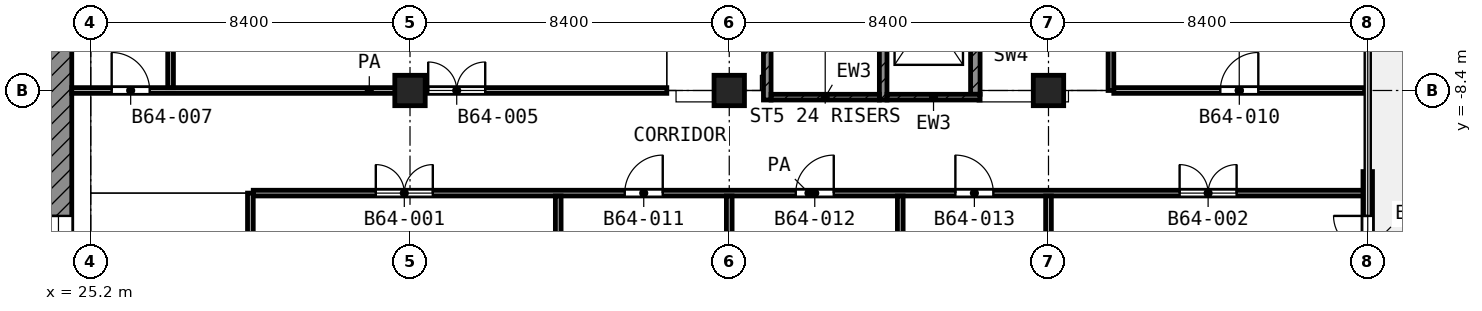
"""IFC4 building model, lengths in metres.
Left out: names, types, materials, properties, quantities, classifications, styles, units other than length and angle.
Written with IfcOpenShell. Run it as: python <this file> out.ifc"""

import sys

from ifc_helpers import new_model, si_unit, direction, frame, frame_2d, origin, origin_2d, place, context, subcontext, project, spatial, rectangle, extrude, element, fill, save


model = new_model("IFC4")
c1 = context("Model", 3, precision=1e-05, world=origin(), true_north=direction((0.0, 1.0)))
c2 = subcontext(c1, "Body", "Model", "MODEL_VIEW")
j1 = project(units=[si_unit("LENGTHUNIT", "METRE"), si_unit("PLANEANGLEUNIT", "RADIAN")], contexts=[c1])
p1 = place(None, origin())
s1 = spatial("IfcSite", under=j1, at=p1, CompositionType="ELEMENT")
p2 = place(p1, origin())
s2 = spatial("IfcBuilding", under=s1, at=p2, CompositionType="ELEMENT")
p3 = place(p2, frame((0.0, 0.0, 277.6)))
s3 = spatial("IfcBuildingStorey", under=s2, at=p3, CompositionType="ELEMENT", Elevation=277.6)
for number, where, z_axis, x_axis in (
    (1, (33.6, -8.4, 0.0), (0.0, 0.0, 1.0), (1.0, 0.0, 0.0)),
    (2, (42.0, -8.4, 0.0), (0.0, 0.0, 1.0), (1.0, 0.0, 0.0)),
    (3, (50.4, -8.4, 0.0), (0.0, 0.0, 1.0), (1.0, 0.0, 0.0)),
):
    element("IfcColumn", number, at=place(p3, frame(where, z_axis=z_axis, x_axis=x_axis)), inside=s3, PredefinedType="COLUMN", context=c2, shape_type="SweptSolid", body=[
        extrude(rectangle(XDim=0.8, YDim=0.8, at=origin_2d()), origin(), (0.0, 0.0, 1.0), 4.2),
    ])
p4 = place(p3, frame((58.8, -14.667, 0.0), z_axis=(0.0, 0.0, 1.0), x_axis=(0.0, 1.0, 0.0)))
e4 = element("IfcWall", 4, at=p4, inside=s3, PredefinedType="SOLIDWALL", context=c2, shape_type="SweptSolid", body=[
    extrude(rectangle(XDim=4.133, YDim=0.25, at=frame_2d((2.067, 0.0))), origin(), (0.0, 0.0, 1.0), 3.48),
])
p5 = place(p4, frame((1.167, 0.0, 0.0)))
e5 = element("IfcOpeningElement", 5, at=p5, cuts=e4, PredefinedType="OPENING", context=c2, shape_type="SweptSolid", body=[
    extrude(rectangle(XDim=1.8, YDim=2.1, at=frame_2d((0.9, 1.05))), frame((0.0, 0.135, 0.0), z_axis=(0.0, -1.0, 0.0), x_axis=(1.0, 0.0, 0.0)), (0.0, 0.0, 1.0), 0.27),
])
p6 = place(p3, frame((24.35, -24.0, 0.0), z_axis=(0.0, 0.0, 1.0), x_axis=(0.0, 1.0, 0.0)))
e6 = element("IfcWall", 6, at=p6, inside=s3, PredefinedType="SHEAR", context=c2, shape_type="SweptSolid", body=[
    extrude(rectangle(XDim=18.6, YDim=0.7, at=frame_2d((9.3, 0.0))), origin(), (0.0, 0.0, 1.0), 3.6),
])
p7 = place(p6, frame((10.5, 0.0, 0.0)))
e7 = element("IfcOpeningElement", 7, at=p7, cuts=e6, PredefinedType="OPENING", context=c2, shape_type="SweptSolid", body=[
    extrude(rectangle(XDim=1.8, YDim=2.1, at=frame_2d((0.9, 1.05))), frame((0.0, 0.36, 0.0), z_axis=(0.0, -1.0, 0.0), x_axis=(1.0, 0.0, 0.0)), (0.0, 0.0, 1.0), 0.72),
])
p8 = place(p3, frame((43.0, -8.65, 0.0), z_axis=(0.0, 0.0, 1.0), x_axis=(0.0, 1.0, 0.0)))
e8 = element("IfcWall", 8, at=p8, inside=s3, PredefinedType="SHEAR", context=c2, shape_type="SweptSolid", body=[
    extrude(rectangle(XDim=8.35, YDim=0.2, at=frame_2d((4.175, 0.0))), origin(), (0.0, 0.0, 1.0), 3.6),
])
p9 = place(p8, frame((7.0, 0.0, 0.0)))
e9 = element("IfcOpeningElement", 9, at=p9, cuts=e8, PredefinedType="OPENING", context=c2, shape_type="SweptSolid", body=[
    extrude(rectangle(XDim=1.1, YDim=2.1, at=frame_2d((0.55, 1.05))), frame((0.0, 0.11, 0.0), z_axis=(0.0, -1.0, 0.0), x_axis=(1.0, 0.0, 0.0)), (0.0, 0.0, 1.0), 0.22),
])
p10 = place(p3, frame((46.05, -8.65, 0.0), z_axis=(0.0, 0.0, 1.0), x_axis=(0.0, 1.0, 0.0)))
e10 = element("IfcWall", 10, at=p10, inside=s3, PredefinedType="SHEAR", context=c2, shape_type="SweptSolid", body=[
    extrude(rectangle(XDim=8.35, YDim=0.2, at=frame_2d((4.175, 0.0))), origin(), (0.0, 0.0, 1.0), 3.6),
])
p11 = place(p10, frame((7.0, 0.0, 0.0)))
e11 = element("IfcOpeningElement", 11, at=p11, cuts=e10, PredefinedType="OPENING", context=c2, shape_type="SweptSolid", body=[
    extrude(rectangle(XDim=1.1, YDim=2.1, at=frame_2d((0.55, 1.05))), frame((0.0, 0.11, 0.0), z_axis=(0.0, -1.0, 0.0), x_axis=(1.0, 0.0, 0.0)), (0.0, 0.0, 1.0), 0.22),
])
p12 = place(p3, frame((43.1, -8.575, 0.0), z_axis=(0.0, 0.0, 1.0), x_axis=(1.0, 0.0, 0.0)))
e12 = element("IfcWall", 12, at=p12, inside=s3, PredefinedType="SHEAR", context=c2, shape_type="SweptSolid", body=[
    extrude(rectangle(XDim=2.85, YDim=0.15, at=frame_2d((1.425, 0.0))), origin(), (0.0, 0.0, 1.0), 3.6),
])
p13 = place(p3, frame((46.15, -8.575, 0.0), z_axis=(0.0, 0.0, 1.0), x_axis=(1.0, 0.0, 0.0)))
e13 = element("IfcWall", 13, at=p13, inside=s3, PredefinedType="SHEAR", context=c2, shape_type="SweptSolid", body=[
    extrude(rectangle(XDim=2.45, YDim=0.15, at=frame_2d((1.225, 0.0))), origin(), (0.0, 0.0, 1.0), 3.6),
])
p14 = place(p3, frame((48.475, -8.5, 0.0), z_axis=(0.0, 0.0, 1.0), x_axis=(0.0, 1.0, 0.0)))
e14 = element("IfcWall", 14, at=p14, inside=s3, PredefinedType="SHEAR", context=c2, shape_type="SweptSolid", body=[
    extrude(rectangle(XDim=3.475, YDim=0.25, at=frame_2d((1.738, 0.0))), origin(), (0.0, 0.0, 1.0), 3.6),
])
p15 = place(p3, frame((29.475, -11.1, 0.0), z_axis=(0.0, 0.0, 1.0), x_axis=(1.0, 0.0, 0.0)))
e15 = element("IfcWall", 15, at=p15, inside=s3, PredefinedType="PARTITIONING", context=c2, shape_type="SweptSolid", body=[
    extrude(rectangle(XDim=29.245, YDim=0.15, at=frame_2d((14.623, 0.0))), origin(), (0.0, 0.0, 1.0), 3.6),
])
p16 = place(p15, frame((3.225, 0.0, 0.0)))
e16 = element("IfcOpeningElement", 16, at=p16, cuts=e15, PredefinedType="OPENING", context=c2, shape_type="SweptSolid", body=[
    extrude(rectangle(XDim=1.5, YDim=2.1, at=frame_2d((0.75, 1.05))), frame((0.0, 0.085, 0.0), z_axis=(0.0, -1.0, 0.0), x_axis=(1.0, 0.0, 0.0)), (0.0, 0.0, 1.0), 0.17),
])
p17 = place(p15, frame((9.775, 0.0, 0.0)))
e17 = element("IfcOpeningElement", 17, at=p17, cuts=e15, PredefinedType="OPENING", context=c2, shape_type="SweptSolid", body=[
    extrude(rectangle(XDim=1.0, YDim=2.1, at=frame_2d((0.5, 1.05))), frame((0.0, 0.085, 0.0), z_axis=(0.0, -1.0, 0.0), x_axis=(1.0, 0.0, 0.0)), (0.0, 0.0, 1.0), 0.17),
])
p18 = place(p15, frame((14.275, 0.0, 0.0)))
e18 = element("IfcOpeningElement", 18, at=p18, cuts=e15, PredefinedType="OPENING", context=c2, shape_type="SweptSolid", body=[
    extrude(rectangle(XDim=1.0, YDim=2.1, at=frame_2d((0.5, 1.05))), frame((0.0, 0.085, 0.0), z_axis=(0.0, -1.0, 0.0), x_axis=(1.0, 0.0, 0.0)), (0.0, 0.0, 1.0), 0.17),
])
p19 = place(p15, frame((18.475, 0.0, 0.0)))
e19 = element("IfcOpeningElement", 19, at=p19, cuts=e15, PredefinedType="OPENING", context=c2, shape_type="SweptSolid", body=[
    extrude(rectangle(XDim=1.0, YDim=2.1, at=frame_2d((0.5, 1.05))), frame((0.0, 0.085, 0.0), z_axis=(0.0, -1.0, 0.0), x_axis=(1.0, 0.0, 0.0)), (0.0, 0.0, 1.0), 0.17),
])
p20 = place(p15, frame((24.375, 0.0, 0.0)))
e20 = element("IfcOpeningElement", 20, at=p20, cuts=e15, PredefinedType="OPENING", context=c2, shape_type="SweptSolid", body=[
    extrude(rectangle(XDim=1.5, YDim=2.1, at=frame_2d((0.75, 1.05))), frame((0.0, 0.085, 0.0), z_axis=(0.0, -1.0, 0.0), x_axis=(1.0, 0.0, 0.0)), (0.0, 0.0, 1.0), 0.17),
])
p21 = place(p3, frame((24.7, -8.4, 0.0), z_axis=(0.0, 0.0, 1.0), x_axis=(1.0, 0.0, 0.0)))
e21 = element("IfcWall", 21, at=p21, inside=s3, PredefinedType="PARTITIONING", context=c2, shape_type="SweptSolid", body=[
    extrude(rectangle(XDim=15.657, YDim=0.15, at=frame_2d((7.829, 0.0))), origin(), (0.0, 0.0, 1.0), 3.6),
])
p22 = place(p21, frame((1.05, 0.0, 0.0)))
e22 = element("IfcOpeningElement", 22, at=p22, cuts=e21, PredefinedType="OPENING", context=c2, shape_type="SweptSolid", body=[
    extrude(rectangle(XDim=1.0, YDim=2.1, at=frame_2d((0.5, 1.05))), frame((0.0, 0.085, 0.0), z_axis=(0.0, -1.0, 0.0), x_axis=(1.0, 0.0, 0.0)), (0.0, 0.0, 1.0), 0.17),
])
p23 = place(p21, frame((9.379, 0.0, 0.0)))
e23 = element("IfcOpeningElement", 23, at=p23, cuts=e21, PredefinedType="OPENING", context=c2, shape_type="SweptSolid", body=[
    extrude(rectangle(XDim=1.5, YDim=2.1, at=frame_2d((0.75, 1.05))), frame((0.0, 0.085, 0.0), z_axis=(0.0, -1.0, 0.0), x_axis=(1.0, 0.0, 0.0)), (0.0, 0.0, 1.0), 0.17),
])
p24 = place(p3, frame((52.118, -8.4, 0.0), z_axis=(0.0, 0.0, 1.0), x_axis=(1.0, 0.0, 0.0)))
e24 = element("IfcWall", 24, at=p24, inside=s3, PredefinedType="PARTITIONING", context=c2, shape_type="SweptSolid", body=[
    extrude(rectangle(XDim=6.602, YDim=0.15, at=frame_2d((3.301, 0.0))), origin(), (0.0, 0.0, 1.0), 3.6),
])
p25 = place(p24, frame((2.803, 0.0, 0.0)))
e25 = element("IfcOpeningElement", 25, at=p25, cuts=e24, PredefinedType="OPENING", context=c2, shape_type="SweptSolid", body=[
    extrude(rectangle(XDim=1.0, YDim=2.1, at=frame_2d((0.5, 1.05))), frame((0.0, 0.085, 0.0), z_axis=(0.0, -1.0, 0.0), x_axis=(1.0, 0.0, 0.0)), (0.0, 0.0, 1.0), 0.17),
])
p26 = place(p3, frame((27.3, -8.325, 0.0), z_axis=(0.0, 0.0, 1.0), x_axis=(0.0, 1.0, 0.0)))
e26 = element("IfcWall", 26, at=p26, inside=s3, PredefinedType="PARTITIONING", context=c2, shape_type="SweptSolid", body=[
    extrude(rectangle(XDim=8.245, YDim=0.15, at=frame_2d((4.123, 0.0))), origin(), (0.0, 0.0, 1.0), 3.6),
])
p27 = place(p3, frame((29.4, -31.198, 0.0), z_axis=(0.0, 0.0, 1.0), x_axis=(0.0, 1.0, 0.0)))
e27 = element("IfcWall", 27, at=p27, inside=s3, PredefinedType="PARTITIONING", context=c2, shape_type="SweptSolid", body=[
    extrude(rectangle(XDim=20.098, YDim=0.15, at=frame_2d((10.049, 0.0))), origin(), (0.0, 0.0, 1.0), 3.6),
])
for number, where, z_axis, x_axis in (
    (28, (37.5, -16.72, 0.0), (0.0, 0.0, 1.0), (0.0, 1.0, 0.0)),
    (29, (42.0, -16.72, 0.0), (0.0, 0.0, 1.0), (0.0, 1.0, 0.0)),
    (30, (46.5, -16.72, 0.0), (0.0, 0.0, 1.0), (0.0, 1.0, 0.0)),
    (31, (50.4, -16.72, 0.0), (0.0, 0.0, 1.0), (0.0, 1.0, 0.0)),
):
    element("IfcWall", number, at=place(p3, frame(where, z_axis=z_axis, x_axis=x_axis)), inside=s3, PredefinedType="PARTITIONING", context=c2, shape_type="SweptSolid", body=[
        extrude(rectangle(XDim=5.545, YDim=0.15, at=frame_2d((2.772, 0.0))), origin(), (0.0, 0.0, 1.0), 3.6),
    ])
p28 = place(p3, frame((52.043, -8.4, 0.0), z_axis=(0.0, 0.0, 1.0), x_axis=(0.0, 1.0, 0.0)))
e32 = element("IfcWall", 32, at=p28, inside=s3, PredefinedType="PARTITIONING", context=c2, shape_type="SweptSolid", body=[
    extrude(rectangle(XDim=6.55, YDim=0.15, at=frame_2d((3.275, 0.0))), origin(), (0.0, 0.0, 1.0), 3.6),
])
p29 = place(p5, origin())
e33 = element("IfcDoor", 33, at=p29, inside=s3, OperationType="DOUBLE_DOOR_SINGLE_SWING", PredefinedType="DOOR", context=c2, shape_type="SweptSolid", body=[
    extrude(rectangle(XDim=1.8, YDim=2.1, at=frame_2d((0.9, 1.05))), frame((0.0, 0.025, 0.0), z_axis=(0.0, -1.0, 0.0), x_axis=(1.0, 0.0, 0.0)), (0.0, 0.0, 1.0), 0.05),
])
fill(e5, e33)
p30 = place(p7, origin())
e34 = element("IfcDoor", 34, at=p30, inside=s3, OperationType="DOUBLE_DOOR_SINGLE_SWING", PredefinedType="DOOR", context=c2, shape_type="SweptSolid", body=[
    extrude(rectangle(XDim=1.8, YDim=2.1, at=frame_2d((0.9, 1.05))), frame((0.0, 0.025, 0.0), z_axis=(0.0, -1.0, 0.0), x_axis=(1.0, 0.0, 0.0)), (0.0, 0.0, 1.0), 0.05),
])
fill(e7, e34)
p31 = place(p25, origin())
e35 = element("IfcDoor", 35, at=p31, inside=s3, OperationType="SINGLE_SWING_RIGHT", PredefinedType="DOOR", context=c2, shape_type="SweptSolid", body=[
    extrude(rectangle(XDim=1.0, YDim=2.1, at=frame_2d((0.5, 1.05))), frame((0.0, 0.025, 0.0), z_axis=(0.0, -1.0, 0.0), x_axis=(1.0, 0.0, 0.0)), (0.0, 0.0, 1.0), 0.05),
])
fill(e25, e35)
p32 = place(p16, origin())
e36 = element("IfcDoor", 36, at=p32, inside=s3, OperationType="DOUBLE_DOOR_SINGLE_SWING", PredefinedType="DOOR", context=c2, shape_type="SweptSolid", body=[
    extrude(rectangle(XDim=1.5, YDim=2.1, at=frame_2d((0.75, 1.05))), frame((0.0, 0.025, 0.0), z_axis=(0.0, -1.0, 0.0), x_axis=(1.0, 0.0, 0.0)), (0.0, 0.0, 1.0), 0.05),
])
fill(e16, e36)
p33 = place(p17, origin())
e37 = element("IfcDoor", 37, at=p33, inside=s3, OperationType="SINGLE_SWING_RIGHT", PredefinedType="DOOR", context=c2, shape_type="SweptSolid", body=[
    extrude(rectangle(XDim=1.0, YDim=2.1, at=frame_2d((0.5, 1.05))), frame((0.0, 0.025, 0.0), z_axis=(0.0, -1.0, 0.0), x_axis=(1.0, 0.0, 0.0)), (0.0, 0.0, 1.0), 0.05),
])
fill(e17, e37)
p34 = place(p18, origin())
e38 = element("IfcDoor", 38, at=p34, inside=s3, OperationType="SINGLE_SWING_RIGHT", PredefinedType="DOOR", context=c2, shape_type="SweptSolid", body=[
    extrude(rectangle(XDim=1.0, YDim=2.1, at=frame_2d((0.5, 1.05))), frame((0.0, 0.025, 0.0), z_axis=(0.0, -1.0, 0.0), x_axis=(1.0, 0.0, 0.0)), (0.0, 0.0, 1.0), 0.05),
])
fill(e18, e38)
p35 = place(p19, origin())
e39 = element("IfcDoor", 39, at=p35, inside=s3, OperationType="SINGLE_SWING_LEFT", PredefinedType="DOOR", context=c2, shape_type="SweptSolid", body=[
    extrude(rectangle(XDim=1.0, YDim=2.1, at=frame_2d((0.5, 1.05))), frame((0.0, 0.025, 0.0), z_axis=(0.0, -1.0, 0.0), x_axis=(1.0, 0.0, 0.0)), (0.0, 0.0, 1.0), 0.05),
])
fill(e19, e39)
p36 = place(p20, origin())
e40 = element("IfcDoor", 40, at=p36, inside=s3, OperationType="DOUBLE_DOOR_SINGLE_SWING", PredefinedType="DOOR", context=c2, shape_type="SweptSolid", body=[
    extrude(rectangle(XDim=1.5, YDim=2.1, at=frame_2d((0.75, 1.05))), frame((0.0, 0.025, 0.0), z_axis=(0.0, -1.0, 0.0), x_axis=(1.0, 0.0, 0.0)), (0.0, 0.0, 1.0), 0.05),
])
fill(e20, e40)
p37 = place(p22, origin())
e41 = element("IfcDoor", 41, at=p37, inside=s3, OperationType="SINGLE_SWING_LEFT", PredefinedType="DOOR", context=c2, shape_type="SweptSolid", body=[
    extrude(rectangle(XDim=1.0, YDim=2.1, at=frame_2d((0.5, 1.05))), frame((0.0, 0.025, 0.0), z_axis=(0.0, -1.0, 0.0), x_axis=(1.0, 0.0, 0.0)), (0.0, 0.0, 1.0), 0.05),
])
fill(e22, e41)
p38 = place(p23, origin())
e42 = element("IfcDoor", 42, at=p38, inside=s3, OperationType="DOUBLE_DOOR_SINGLE_SWING", PredefinedType="DOOR", context=c2, shape_type="SweptSolid", body=[
    extrude(rectangle(XDim=1.5, YDim=2.1, at=frame_2d((0.75, 1.05))), frame((0.0, 0.025, 0.0), z_axis=(0.0, -1.0, 0.0), x_axis=(1.0, 0.0, 0.0)), (0.0, 0.0, 1.0), 0.05),
])
fill(e23, e42)
save(model, sys.argv[1])
